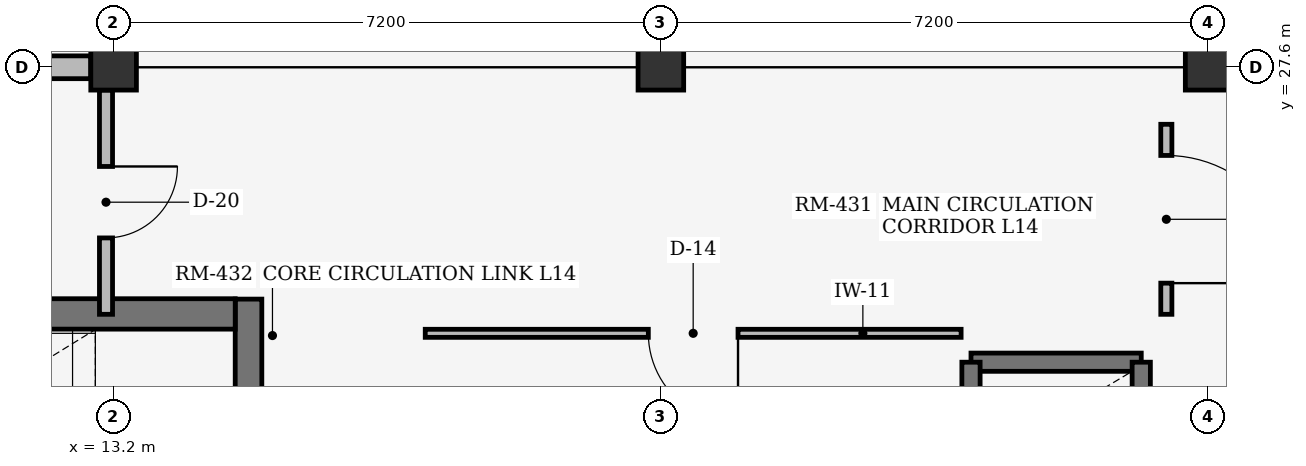
"""IFC4 building model, lengths in metres.
Left out: names, types, materials, properties, quantities, classifications, styles, units other than length and angle.
Written with IfcOpenShell. Run it as: python <this file> out.ifc"""

import sys

from ifc_helpers import new_model, si_unit, direction, frame, frame_2d, origin, origin_2d, place, context, subcontext, project, spatial, rectangle, extrude, element, fill, save


model = new_model("IFC4")
c1 = context("Model", 3, precision=1e-05, world=origin(), true_north=direction((0.0, 1.0)))
c2 = subcontext(c1, "Body", "Model", "MODEL_VIEW")
j1 = project(units=[si_unit("LENGTHUNIT", "METRE"), si_unit("PLANEANGLEUNIT", "RADIAN")], contexts=[c1])
p1 = place(None, origin())
s1 = spatial("IfcSite", under=j1, at=p1, CompositionType="ELEMENT")
p2 = place(p1, origin())
s2 = spatial("IfcBuilding", under=s1, at=p2, CompositionType="ELEMENT")
p3 = place(p2, frame((0.0, 0.0, 56.1)))
s3 = spatial("IfcBuildingStorey", under=s2, at=p3, CompositionType="ELEMENT", Elevation=56.1)
for number, where, z_axis, x_axis in (
    (1, (13.2, 27.6, 0.0), (0.0, 0.0, 1.0), (1.0, 0.0, 0.0)),
    (2, (20.4, 27.6, 0.0), (0.0, 0.0, 1.0), (1.0, 0.0, 0.0)),
    (3, (27.6, 27.6, 0.0), (0.0, 0.0, 1.0), (1.0, 0.0, 0.0)),
):
    element("IfcColumn", number, at=place(p3, frame(where, z_axis=z_axis, x_axis=x_axis)), inside=s3, PredefinedType="COLUMN", context=c2, shape_type="SweptSolid", body=[
        extrude(rectangle(XDim=0.6, YDim=0.6, at=origin_2d()), origin(), (0.0, 0.0, 1.0), 3.088),
    ])
p4 = place(p3, frame((6.3, 27.6, 0.0), z_axis=(0.0, 0.0, 1.0), x_axis=(1.0, 0.0, 0.0)))
e4 = element("IfcWall", 4, at=p4, inside=s3, PredefinedType="STANDARD", context=c2, shape_type="SweptSolid", body=[
    extrude(rectangle(XDim=6.6, YDim=0.3, at=frame_2d((3.3, 0.0))), origin(), (0.0, 0.0, 1.0), 2.695),
])
p5 = place(p4, frame((2.625, 0.0, 0.75)))
e5 = element("IfcOpeningElement", 5, at=p5, cuts=e4, PredefinedType="OPENING", context=c2, shape_type="SweptSolid", body=[
    extrude(rectangle(XDim=1.35, YDim=1.5, at=frame_2d((0.675, 0.75))), frame((0.0, 0.16, 0.0), z_axis=(0.0, -1.0, 0.0), x_axis=(1.0, 0.0, 0.0)), (0.0, 0.0, 1.0), 0.32),
])
p6 = place(p3, frame((14.975, 24.55, 0.0), z_axis=(0.0, 0.0, 1.0), x_axis=(0.0, -1.0, 0.0)))
e6 = element("IfcWall", 6, at=p6, inside=s3, PredefinedType="SHEAR", context=c2, shape_type="SweptSolid", body=[
    extrude(rectangle(XDim=4.59, YDim=0.35, at=frame_2d((2.295, 0.0))), origin(), (0.0, 0.0, 1.0), 3.115),
])
p7 = place(p6, frame((1.72, 0.0, 0.0)))
e7 = element("IfcOpeningElement", 7, at=p7, cuts=e6, PredefinedType="OPENING", context=c2, shape_type="SweptSolid", body=[
    extrude(rectangle(XDim=1.15, YDim=2.2, at=frame_2d((0.575, 1.1))), frame((0.0, 0.185, 0.0), z_axis=(0.0, -1.0, 0.0), x_axis=(1.0, 0.0, 0.0)), (0.0, 0.0, 1.0), 0.37),
])
p8 = place(p3, frame((14.8, 24.355, 0.0), z_axis=(0.0, 0.0, 1.0), x_axis=(-1.0, 0.0, 0.0)))
e8 = element("IfcWall", 8, at=p8, inside=s3, PredefinedType="SHEAR", context=c2, shape_type="SweptSolid", body=[
    extrude(rectangle(XDim=7.98, YDim=0.4, at=frame_2d((3.99, 0.0))), origin(), (0.0, 0.0, 1.0), 3.115),
])
p9 = place(p3, frame((24.48, 23.72, 0.0), z_axis=(0.0, 0.0, 1.0), x_axis=(1.0, 0.0, 0.0)))
e9 = element("IfcWall", 9, at=p9, inside=s3, PredefinedType="SHEAR", context=c2, shape_type="SweptSolid", body=[
    extrude(rectangle(XDim=2.24, YDim=0.24, at=frame_2d((1.12, 0.0))), origin(), (0.0, 0.0, 1.0), 3.115),
])
for number, where, z_axis, x_axis in (
    (10, (24.48, 20.78, 0.0), (0.0, 0.0, 1.0), (0.0, 1.0, 0.0)),
    (11, (26.72, 20.78, 0.0), (0.0, 0.0, 1.0), (0.0, 1.0, 0.0)),
):
    element("IfcWall", number, at=place(p3, frame(where, z_axis=z_axis, x_axis=x_axis)), inside=s3, PredefinedType="SHEAR", context=c2, shape_type="SweptSolid", body=[
        extrude(rectangle(XDim=2.94, YDim=0.24, at=frame_2d((1.47, 0.0))), origin(), (0.0, 0.0, 1.0), 3.115),
    ])
p10 = place(p3, frame((17.3, 24.1, 0.0), z_axis=(0.0, 0.0, 1.0), x_axis=(1.0, 0.0, 0.0)))
e12 = element("IfcWall", 12, at=p10, inside=s3, PredefinedType="PARTITIONING", context=c2, shape_type="SweptSolid", body=[
    extrude(rectangle(XDim=7.05, YDim=0.106, at=frame_2d((3.525, 0.0))), origin(), (0.0, 0.0, 1.0), 3.095),
])
p11 = place(p10, frame((2.935, 0.0, 0.0)))
e13 = element("IfcOpeningElement", 13, at=p11, cuts=e12, PredefinedType="OPENING", context=c2, shape_type="SweptSolid", body=[
    extrude(rectangle(XDim=1.18, YDim=2.1, at=frame_2d((0.59, 1.05))), frame((0.0, 0.063, 0.0), z_axis=(0.0, -1.0, 0.0), x_axis=(1.0, 0.0, 0.0)), (0.0, 0.0, 1.0), 0.126),
])
p12 = place(p3, frame((27.05, 24.35, 0.0), z_axis=(0.0, 0.0, 1.0), x_axis=(0.0, 1.0, 0.0)))
e14 = element("IfcWall", 14, at=p12, inside=s3, PredefinedType="PARTITIONING", context=c2, shape_type="SweptSolid", body=[
    extrude(rectangle(XDim=2.5, YDim=0.146, at=frame_2d((1.25, 0.0))), origin(), (0.0, 0.0, 1.0), 3.095),
])
p13 = place(p12, frame((0.41, 0.0, 0.0)))
e15 = element("IfcOpeningElement", 15, at=p13, cuts=e14, PredefinedType="OPENING", context=c2, shape_type="SweptSolid", body=[
    extrude(rectangle(XDim=1.68, YDim=2.3, at=frame_2d((0.84, 1.15))), frame((0.0, 0.083, 0.0), z_axis=(0.0, -1.0, 0.0), x_axis=(1.0, 0.0, 0.0)), (0.0, 0.0, 1.0), 0.166),
])
p14 = place(p3, frame((13.1, 24.35, 0.0), z_axis=(0.0, 0.0, 1.0), x_axis=(0.0, 1.0, 0.0)))
e16 = element("IfcWall", 16, at=p14, inside=s3, PredefinedType="PARTITIONING", context=c2, shape_type="SweptSolid", body=[
    extrude(rectangle(XDim=2.95, YDim=0.172, at=frame_2d((1.475, 0.0))), origin(), (0.0, 0.0, 1.0), 2.678),
])
p15 = place(p14, frame((1.005, 0.0, 0.0)))
e17 = element("IfcOpeningElement", 17, at=p15, cuts=e16, PredefinedType="OPENING", context=c2, shape_type="SweptSolid", body=[
    extrude(rectangle(XDim=0.94, YDim=2.18, at=frame_2d((0.47, 1.09))), frame((0.0, 0.096, 0.0), z_axis=(0.0, -1.0, 0.0), x_axis=(1.0, 0.0, 0.0)), (0.0, 0.0, 1.0), 0.192),
])
p16 = place(p11, origin())
e18 = element("IfcDoor", 18, at=p16, inside=s3, OperationType="SINGLE_SWING_RIGHT", PredefinedType="DOOR", context=c2, shape_type="SweptSolid", body=[
    extrude(rectangle(XDim=1.18, YDim=2.1, at=frame_2d((0.59, 1.05))), frame((0.0, 0.025, 0.0), z_axis=(0.0, -1.0, 0.0), x_axis=(1.0, 0.0, 0.0)), (0.0, 0.0, 1.0), 0.05),
])
fill(e13, e18)
p17 = place(p13, frame((1.68, 0.0, 0.0), z_axis=(0.0, 0.0, 1.0), x_axis=(-1.0, 0.0, 0.0)))
e19 = element("IfcDoor", 19, at=p17, inside=s3, OperationType="DOUBLE_DOOR_SINGLE_SWING", PredefinedType="DOOR", context=c2, shape_type="SweptSolid", body=[
    extrude(rectangle(XDim=1.68, YDim=2.3, at=frame_2d((0.84, 1.15))), frame((0.0, 0.025, 0.0), z_axis=(0.0, -1.0, 0.0), x_axis=(1.0, 0.0, 0.0)), (0.0, 0.0, 1.0), 0.05),
])
fill(e15, e19)
p18 = place(p15, origin())
e20 = element("IfcDoor", 20, at=p18, inside=s3, OperationType="SINGLE_SWING_RIGHT", PredefinedType="DOOR", context=c2, shape_type="SweptSolid", body=[
    extrude(rectangle(XDim=0.94, YDim=2.18, at=frame_2d((0.47, 1.09))), frame((0.0, 0.025, 0.0), z_axis=(0.0, -1.0, 0.0), x_axis=(1.0, 0.0, 0.0)), (0.0, 0.0, 1.0), 0.05),
])
fill(e17, e20)
save(model, sys.argv[1])
